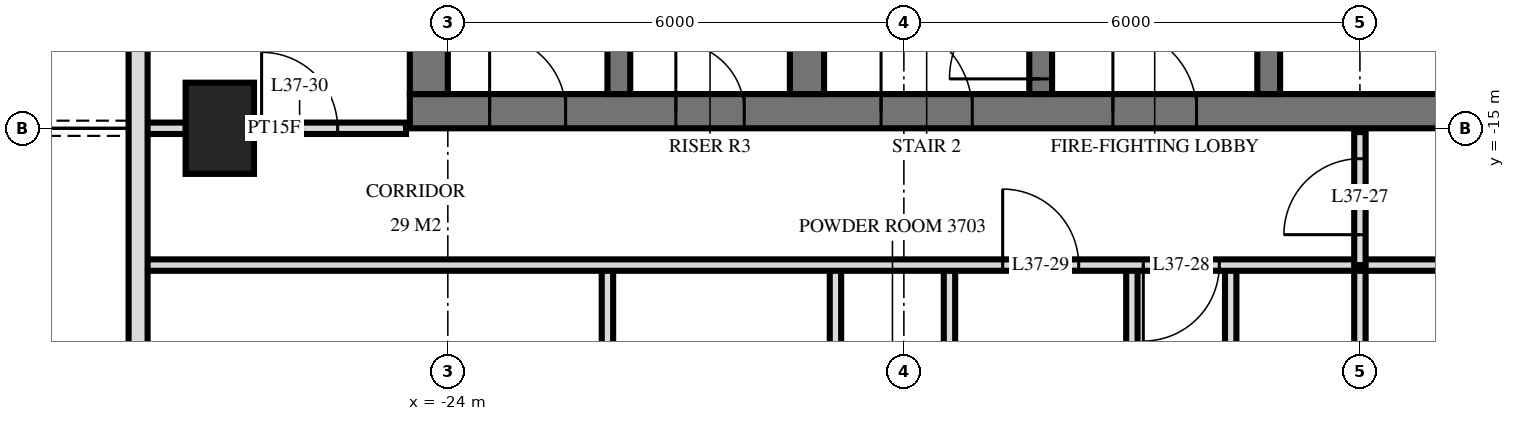
"""IFC4 building model, lengths in metres.
Left out: names, types, materials, properties, quantities, classifications, styles, units other than length and angle.
Written with IfcOpenShell. Run it as: python <this file> out.ifc"""

import sys

from ifc_helpers import new_model, si_unit, direction, frame, frame_2d, origin, origin_2d, place, context, subcontext, project, spatial, rectangle, extrude, element, fill, save


model = new_model("IFC4")
c1 = context("Model", 3, precision=1e-05, world=origin(), true_north=direction((0.0, 1.0)))
c2 = subcontext(c1, "Body", "Model", "MODEL_VIEW")
j1 = project(units=[si_unit("LENGTHUNIT", "METRE"), si_unit("PLANEANGLEUNIT", "RADIAN")], contexts=[c1])
p1 = place(None, origin())
s1 = spatial("IfcSite", under=j1, at=p1, CompositionType="ELEMENT")
p2 = place(p1, origin())
s2 = spatial("IfcBuilding", under=s1, at=p2, CompositionType="ELEMENT")
p3 = place(p2, frame((0.0, 0.0, 145.2)))
s3 = spatial("IfcBuildingStorey", under=s2, at=p3, CompositionType="ELEMENT", Elevation=145.2)
p4 = place(p3, frame((-27.0, -15.0, 0.0), z_axis=(0.0, 0.0, 1.0), x_axis=(0.0, 1.0, 0.0)))
e1 = element("IfcColumn", 1, at=p4, inside=s3, PredefinedType="COLUMN", context=c2, shape_type="SweptSolid", body=[
    extrude(rectangle(XDim=1.2, YDim=0.9, at=origin_2d()), origin(), (0.0, 0.0, 1.0), 3.6),
])
p5 = place(p3, frame((-24.5, -14.775, 0.0), z_axis=(0.0, 0.0, 1.0), x_axis=(1.0, 0.0, 0.0)))
e2 = element("IfcWall", 2, at=p5, inside=s3, PredefinedType="SHEAR", context=c2, shape_type="SweptSolid", body=[
    extrude(rectangle(XDim=14.5, YDim=0.45, at=frame_2d((7.25, 0.0))), origin(), (0.0, 0.0, 1.0), 3.6),
])
p6 = place(p5, frame((6.2, 0.0, 0.0)))
e3 = element("IfcOpeningElement", 3, at=p6, cuts=e2, PredefinedType="OPENING", context=c2, shape_type="SweptSolid", body=[
    extrude(rectangle(XDim=1.2, YDim=2.1, at=frame_2d((0.6, 1.05))), frame((0.0, 0.235, 0.0), z_axis=(0.0, -1.0, 0.0), x_axis=(1.0, 0.0, 0.0)), (0.0, 0.0, 1.0), 0.47),
])
p7 = place(p5, frame((9.25, 0.0, 0.0)))
e4 = element("IfcOpeningElement", 4, at=p7, cuts=e2, PredefinedType="OPENING", context=c2, shape_type="SweptSolid", body=[
    extrude(rectangle(XDim=1.1, YDim=2.1, at=frame_2d((0.55, 1.05))), frame((0.0, 0.235, 0.0), z_axis=(0.0, -1.0, 0.0), x_axis=(1.0, 0.0, 0.0)), (0.0, 0.0, 1.0), 0.47),
])
p8 = place(p5, frame((3.5, 0.0, 0.0)))
e5 = element("IfcOpeningElement", 5, at=p8, cuts=e2, PredefinedType="OPENING", context=c2, shape_type="SweptSolid", body=[
    extrude(rectangle(XDim=0.9, YDim=2.1, at=frame_2d((0.45, 1.05))), frame((0.0, 0.235, 0.0), z_axis=(0.0, -1.0, 0.0), x_axis=(1.0, 0.0, 0.0)), (0.0, 0.0, 1.0), 0.47),
])
p9 = place(p5, frame((1.05, 0.0, 0.0)))
e6 = element("IfcOpeningElement", 6, at=p9, cuts=e2, PredefinedType="OPENING", context=c2, shape_type="SweptSolid", body=[
    extrude(rectangle(XDim=1.0, YDim=2.1, at=frame_2d((0.5, 1.05))), frame((0.0, 0.235, 0.0), z_axis=(0.0, -1.0, 0.0), x_axis=(1.0, 0.0, 0.0)), (0.0, 0.0, 1.0), 0.47),
])
p10 = place(p3, frame((-24.25, -14.55, 0.0), z_axis=(0.0, 0.0, 1.0), x_axis=(0.0, 1.0, 0.0)))
e7 = element("IfcWall", 7, at=p10, inside=s3, PredefinedType="SHEAR", context=c2, shape_type="SweptSolid", body=[
    extrude(rectangle(XDim=14.1, YDim=0.5, at=frame_2d((7.05, 0.0))), origin(), (0.0, 0.0, 1.0), 3.6),
])
p11 = place(p3, frame((-13.2, -14.55, 0.0), z_axis=(0.0, 0.0, 1.0), x_axis=(0.0, 1.0, 0.0)))
e8 = element("IfcWall", 8, at=p11, inside=s3, PredefinedType="SHEAR", context=c2, shape_type="SweptSolid", body=[
    extrude(rectangle(XDim=5.4, YDim=0.3, at=frame_2d((2.7, 0.0))), origin(), (0.0, 0.0, 1.0), 3.6),
])
p12 = place(p11, frame((4.0, 0.0, 0.0)))
e9 = element("IfcOpeningElement", 9, at=p12, cuts=e8, PredefinedType="OPENING", context=c2, shape_type="SweptSolid", body=[
    extrude(rectangle(XDim=1.2, YDim=2.1, at=frame_2d((0.6, 1.05))), frame((0.0, 0.16, 0.0), z_axis=(0.0, -1.0, 0.0), x_axis=(1.0, 0.0, 0.0)), (0.0, 0.0, 1.0), 0.32),
])
p13 = place(p3, frame((-16.2, -14.55, 0.0), z_axis=(0.0, 0.0, 1.0), x_axis=(0.0, 1.0, 0.0)))
e10 = element("IfcWall", 10, at=p13, inside=s3, PredefinedType="SHEAR", context=c2, shape_type="SweptSolid", body=[
    extrude(rectangle(XDim=5.4, YDim=0.3, at=frame_2d((2.7, 0.0))), origin(), (0.0, 0.0, 1.0), 3.6),
])
p14 = place(p13, frame((0.2, 0.0, 0.0)))
e11 = element("IfcOpeningElement", 11, at=p14, cuts=e10, PredefinedType="OPENING", context=c2, shape_type="SweptSolid", body=[
    extrude(rectangle(XDim=1.2, YDim=2.1, at=frame_2d((0.6, 1.05))), frame((0.0, 0.16, 0.0), z_axis=(0.0, -1.0, 0.0), x_axis=(1.0, 0.0, 0.0)), (0.0, 0.0, 1.0), 0.32),
])
p15 = place(p3, frame((-19.275, -14.55, 0.0), z_axis=(0.0, 0.0, 1.0), x_axis=(0.0, 1.0, 0.0)))
e12 = element("IfcWall", 12, at=p15, inside=s3, PredefinedType="SHEAR", context=c2, shape_type="SweptSolid", body=[
    extrude(rectangle(XDim=5.4, YDim=0.45, at=frame_2d((2.7, 0.0))), origin(), (0.0, 0.0, 1.0), 3.6),
])
p16 = place(p3, frame((-21.75, -14.55, 0.0), z_axis=(0.0, 0.0, 1.0), x_axis=(0.0, 1.0, 0.0)))
e13 = element("IfcWall", 13, at=p16, inside=s3, PredefinedType="SHEAR", context=c2, shape_type="SweptSolid", body=[
    extrude(rectangle(XDim=5.4, YDim=0.3, at=frame_2d((2.7, 0.0))), origin(), (0.0, 0.0, 1.0), 3.6),
])
p17 = place(p3, frame((-28.075, -3.325, 0.0), z_axis=(0.0, 0.0, 1.0), x_axis=(0.0, -1.0, 0.0)))
e14 = element("IfcWall", 14, at=p17, inside=s3, PredefinedType="SOLIDWALL", context=c2, shape_type="SweptSolid", body=[
    extrude(rectangle(XDim=25.951, YDim=0.25, at=frame_2d((12.975, 0.0))), origin(), (0.0, 0.0, 1.0), 3.32),
])
p18 = place(p17, frame((7.275, 0.0, 0.0)))
e15 = element("IfcOpeningElement", 15, at=p18, cuts=e14, PredefinedType="OPENING", context=c2, shape_type="SweptSolid", body=[
    extrude(rectangle(XDim=1.8, YDim=2.4, at=frame_2d((0.9, 1.2))), frame((0.0, 0.135, 0.0), z_axis=(0.0, -1.0, 0.0), x_axis=(1.0, 0.0, 0.0)), (0.0, 0.0, 1.0), 0.27),
])
p19 = place(p17, frame((18.175, 0.0, 0.0)))
e16 = element("IfcOpeningElement", 16, at=p19, cuts=e14, PredefinedType="OPENING", context=c2, shape_type="SweptSolid", body=[
    extrude(rectangle(XDim=1.8, YDim=2.4, at=frame_2d((0.9, 1.2))), frame((0.0, 0.135, 0.0), z_axis=(0.0, -1.0, 0.0), x_axis=(1.0, 0.0, 0.0)), (0.0, 0.0, 1.0), 0.27),
])
p20 = place(p17, frame((21.075, 0.0, 0.0)))
e17 = element("IfcOpeningElement", 17, at=p20, cuts=e14, PredefinedType="OPENING", context=c2, shape_type="SweptSolid", body=[
    extrude(rectangle(XDim=1.8, YDim=2.4, at=frame_2d((0.9, 1.2))), frame((0.0, 0.135, 0.0), z_axis=(0.0, -1.0, 0.0), x_axis=(1.0, 0.0, 0.0)), (0.0, 0.0, 1.0), 0.27),
])
p21 = place(p17, frame((23.825, 0.0, 0.3)))
e18 = element("IfcOpeningElement", 18, at=p21, cuts=e14, PredefinedType="OPENING", context=c2, shape_type="SweptSolid", body=[
    extrude(rectangle(XDim=1.8, YDim=2.1, at=frame_2d((0.9, 1.05))), frame((0.0, 0.135, 0.0), z_axis=(0.0, -1.0, 0.0), x_axis=(1.0, 0.0, 0.0)), (0.0, 0.0, 1.0), 0.27),
])
p22 = place(p3, frame((-12.0, -16.8, 0.0), z_axis=(0.0, 0.0, 1.0), x_axis=(0.0, 1.0, 0.0)))
e19 = element("IfcWall", 19, at=p22, inside=s3, PredefinedType="PARTITIONING", context=c2, shape_type="SweptSolid", body=[
    extrude(rectangle(XDim=1.75, YDim=0.15, at=frame_2d((0.875, 0.0))), origin(), (0.0, 0.0, 1.0), 3.32),
])
p23 = place(p22, frame((0.4, 0.0, 0.0)))
e20 = element("IfcOpeningElement", 20, at=p23, cuts=e19, PredefinedType="OPENING", context=c2, shape_type="SweptSolid", body=[
    extrude(rectangle(XDim=1.0, YDim=2.1, at=frame_2d((0.5, 1.05))), frame((0.0, 0.085, 0.0), z_axis=(0.0, -1.0, 0.0), x_axis=(1.0, 0.0, 0.0)), (0.0, 0.0, 1.0), 0.17),
])
p24 = place(p3, frame((-12.0, -33.62, 0.0), z_axis=(0.0, 0.0, 1.0), x_axis=(0.0, 1.0, 0.0)))
e21 = element("IfcWall", 21, at=p24, inside=s3, PredefinedType="PARTITIONING", context=c2, shape_type="SweptSolid", body=[
    extrude(rectangle(XDim=16.82, YDim=0.15, at=frame_2d((8.41, 0.0))), origin(), (0.0, 0.0, 1.0), 3.32),
])
p25 = place(p3, frame((-13.7, -21.8, 0.0), z_axis=(0.0, 0.0, 1.0), x_axis=(0.0, 1.0, 0.0)))
e22 = element("IfcWall", 22, at=p25, inside=s3, PredefinedType="PARTITIONING", context=c2, shape_type="SweptSolid", body=[
    extrude(rectangle(XDim=5.0, YDim=0.15, at=frame_2d((2.5, 0.0))), origin(), (0.0, 0.0, 1.0), 3.32),
])
p26 = place(p25, frame((2.1, 0.0, 0.0)))
e23 = element("IfcOpeningElement", 23, at=p26, cuts=e22, PredefinedType="OPENING", context=c2, shape_type="SweptSolid", body=[
    extrude(rectangle(XDim=0.8, YDim=2.1, at=frame_2d((0.4, 1.05))), frame((0.0, 0.085, 0.0), z_axis=(0.0, -1.0, 0.0), x_axis=(1.0, 0.0, 0.0)), (0.0, 0.0, 1.0), 0.17),
])
p27 = place(p3, frame((-15.0, -21.0, 0.0), z_axis=(0.0, 0.0, 1.0), x_axis=(0.0, 1.0, 0.0)))
e24 = element("IfcWall", 24, at=p27, inside=s3, PredefinedType="PARTITIONING", context=c2, shape_type="SweptSolid", body=[
    extrude(rectangle(XDim=4.2, YDim=0.15, at=frame_2d((2.1, 0.0))), origin(), (0.0, 0.0, 1.0), 3.32),
])
p28 = place(p3, frame((-17.4, -21.0, 0.0), z_axis=(0.0, 0.0, 1.0), x_axis=(0.0, 1.0, 0.0)))
e25 = element("IfcWall", 25, at=p28, inside=s3, PredefinedType="PARTITIONING", context=c2, shape_type="SweptSolid", body=[
    extrude(rectangle(XDim=4.2, YDim=0.15, at=frame_2d((2.1, 0.0))), origin(), (0.0, 0.0, 1.0), 3.32),
])
p29 = place(p28, frame((1.6, 0.0, 0.0)))
e26 = element("IfcOpeningElement", 26, at=p29, cuts=e25, PredefinedType="OPENING", context=c2, shape_type="SweptSolid", body=[
    extrude(rectangle(XDim=1.0, YDim=2.1, at=frame_2d((0.5, 1.05))), frame((0.0, 0.085, 0.0), z_axis=(0.0, -1.0, 0.0), x_axis=(1.0, 0.0, 0.0)), (0.0, 0.0, 1.0), 0.17),
])
p30 = place(p3, frame((-18.9, -21.0, 0.0), z_axis=(0.0, 0.0, 1.0), x_axis=(0.0, 1.0, 0.0)))
e27 = element("IfcWall", 27, at=p30, inside=s3, PredefinedType="PLUMBINGWALL", context=c2, shape_type="SweptSolid", body=[
    extrude(rectangle(XDim=4.2, YDim=0.15, at=frame_2d((2.1, 0.0))), origin(), (0.0, 0.0, 1.0), 3.32),
])
p31 = place(p3, frame((-21.9, -21.0, 0.0), z_axis=(0.0, 0.0, 1.0), x_axis=(0.0, 1.0, 0.0)))
e28 = element("IfcWall", 28, at=p31, inside=s3, PredefinedType="PARTITIONING", context=c2, shape_type="SweptSolid", body=[
    extrude(rectangle(XDim=4.2, YDim=0.15, at=frame_2d((2.1, 0.0))), origin(), (0.0, 0.0, 1.0), 3.32),
])
p32 = place(p3, frame((-28.02, -16.8, 0.0), z_axis=(0.0, 0.0, 1.0), x_axis=(1.0, 0.0, 0.0)))
e29 = element("IfcWall", 29, at=p32, inside=s3, PredefinedType="PARTITIONING", context=c2, shape_type="SweptSolid", body=[
    extrude(rectangle(XDim=56.04, YDim=0.15, at=frame_2d((28.02, 0.0))), origin(), (0.0, 0.0, 1.0), 3.32),
])
p33 = place(p32, frame((13.17, 0.0, 0.0)))
e30 = element("IfcOpeningElement", 30, at=p33, cuts=e29, PredefinedType="OPENING", context=c2, shape_type="SweptSolid", body=[
    extrude(rectangle(XDim=1.0, YDim=2.1, at=frame_2d((0.5, 1.05))), frame((0.0, 0.085, 0.0), z_axis=(0.0, -1.0, 0.0), x_axis=(1.0, 0.0, 0.0)), (0.0, 0.0, 1.0), 0.17),
])
p34 = place(p32, frame((11.32, 0.0, 0.0)))
e31 = element("IfcOpeningElement", 31, at=p34, cuts=e29, PredefinedType="OPENING", context=c2, shape_type="SweptSolid", body=[
    extrude(rectangle(XDim=1.0, YDim=2.1, at=frame_2d((0.5, 1.05))), frame((0.0, 0.085, 0.0), z_axis=(0.0, -1.0, 0.0), x_axis=(1.0, 0.0, 0.0)), (0.0, 0.0, 1.0), 0.17),
])
p35 = place(p32, frame((41.87, 0.0, 0.0)))
e32 = element("IfcOpeningElement", 32, at=p35, cuts=e29, PredefinedType="OPENING", context=c2, shape_type="SweptSolid", body=[
    extrude(rectangle(XDim=1.0, YDim=2.1, at=frame_2d((0.5, 1.05))), frame((0.0, 0.085, 0.0), z_axis=(0.0, -1.0, 0.0), x_axis=(1.0, 0.0, 0.0)), (0.0, 0.0, 1.0), 0.17),
])
p36 = place(p32, frame((43.72, 0.0, 0.0)))
e33 = element("IfcOpeningElement", 33, at=p36, cuts=e29, PredefinedType="OPENING", context=c2, shape_type="SweptSolid", body=[
    extrude(rectangle(XDim=1.0, YDim=2.1, at=frame_2d((0.5, 1.05))), frame((0.0, 0.085, 0.0), z_axis=(0.0, -1.0, 0.0), x_axis=(1.0, 0.0, 0.0)), (0.0, 0.0, 1.0), 0.17),
])
p37 = place(p32, frame((19.52, 0.0, 0.0)))
e34 = element("IfcOpeningElement", 34, at=p37, cuts=e29, PredefinedType="OPENING", context=c2, shape_type="SweptSolid", body=[
    extrude(rectangle(XDim=1.0, YDim=2.1, at=frame_2d((0.5, 1.05))), frame((0.0, 0.085, 0.0), z_axis=(0.0, -1.0, 0.0), x_axis=(1.0, 0.0, 0.0)), (0.0, 0.0, 1.0), 0.17),
])
p38 = place(p32, frame((27.52, 0.0, 0.0)))
e35 = element("IfcOpeningElement", 35, at=p38, cuts=e29, PredefinedType="OPENING", context=c2, shape_type="SweptSolid", body=[
    extrude(rectangle(XDim=1.0, YDim=2.1, at=frame_2d((0.5, 1.05))), frame((0.0, 0.085, 0.0), z_axis=(0.0, -1.0, 0.0), x_axis=(1.0, 0.0, 0.0)), (0.0, 0.0, 1.0), 0.17),
])
p39 = place(p32, frame((35.52, 0.0, 0.0)))
e36 = element("IfcOpeningElement", 36, at=p39, cuts=e29, PredefinedType="OPENING", context=c2, shape_type="SweptSolid", body=[
    extrude(rectangle(XDim=1.0, YDim=2.1, at=frame_2d((0.5, 1.05))), frame((0.0, 0.085, 0.0), z_axis=(0.0, -1.0, 0.0), x_axis=(1.0, 0.0, 0.0)), (0.0, 0.0, 1.0), 0.17),
])
p40 = place(p3, frame((-28.02, -15.0, 0.0), z_axis=(0.0, 0.0, 1.0), x_axis=(1.0, 0.0, 0.0)))
e37 = element("IfcWall", 37, at=p40, inside=s3, PredefinedType="PARTITIONING", context=c2, shape_type="SweptSolid", body=[
    extrude(rectangle(XDim=3.47, YDim=0.15, at=frame_2d((1.735, 0.0))), origin(), (0.0, 0.0, 1.0), 3.32),
])
p41 = place(p40, frame((1.57, 0.0, 0.0)))
e38 = element("IfcOpeningElement", 38, at=p41, cuts=e37, PredefinedType="OPENING", context=c2, shape_type="SweptSolid", body=[
    extrude(rectangle(XDim=1.0, YDim=2.1, at=frame_2d((0.5, 1.05))), frame((0.0, 0.085, 0.0), z_axis=(0.0, -1.0, 0.0), x_axis=(1.0, 0.0, 0.0)), (0.0, 0.0, 1.0), 0.17),
])
p42 = place(p6, origin())
e39 = element("IfcDoor", 39, at=p42, inside=s3, OperationType="SINGLE_SWING_RIGHT", PredefinedType="DOOR", context=c2, shape_type="SweptSolid", body=[
    extrude(rectangle(XDim=1.2, YDim=2.1, at=frame_2d((0.6, 1.05))), frame((0.0, 0.025, 0.0), z_axis=(0.0, -1.0, 0.0), x_axis=(1.0, 0.0, 0.0)), (0.0, 0.0, 1.0), 0.05),
])
fill(e3, e39)
p43 = place(p7, origin())
e40 = element("IfcDoor", 40, at=p43, inside=s3, OperationType="SINGLE_SWING_RIGHT", PredefinedType="DOOR", context=c2, shape_type="SweptSolid", body=[
    extrude(rectangle(XDim=1.1, YDim=2.1, at=frame_2d((0.55, 1.05))), frame((0.0, 0.025, 0.0), z_axis=(0.0, -1.0, 0.0), x_axis=(1.0, 0.0, 0.0)), (0.0, 0.0, 1.0), 0.05),
])
fill(e4, e40)
p44 = place(p8, origin())
e41 = element("IfcDoor", 41, at=p44, inside=s3, OperationType="SINGLE_SWING_RIGHT", PredefinedType="DOOR", context=c2, shape_type="SweptSolid", body=[
    extrude(rectangle(XDim=0.9, YDim=2.1, at=frame_2d((0.45, 1.05))), frame((0.0, 0.025, 0.0), z_axis=(0.0, -1.0, 0.0), x_axis=(1.0, 0.0, 0.0)), (0.0, 0.0, 1.0), 0.05),
])
fill(e5, e41)
p45 = place(p9, origin())
e42 = element("IfcDoor", 42, at=p45, inside=s3, OperationType="SINGLE_SWING_RIGHT", PredefinedType="DOOR", context=c2, shape_type="SweptSolid", body=[
    extrude(rectangle(XDim=1.0, YDim=2.1, at=frame_2d((0.5, 1.05))), frame((0.0, 0.025, 0.0), z_axis=(0.0, -1.0, 0.0), x_axis=(1.0, 0.0, 0.0)), (0.0, 0.0, 1.0), 0.05),
])
fill(e6, e42)
p46 = place(p14, origin())
e43 = element("IfcDoor", 43, at=p46, inside=s3, OperationType="SINGLE_SWING_RIGHT", PredefinedType="DOOR", context=c2, shape_type="SweptSolid", body=[
    extrude(rectangle(XDim=1.2, YDim=2.1, at=frame_2d((0.6, 1.05))), frame((0.0, 0.025, 0.0), z_axis=(0.0, -1.0, 0.0), x_axis=(1.0, 0.0, 0.0)), (0.0, 0.0, 1.0), 0.05),
])
fill(e11, e43)
p47 = place(p23, origin())
e44 = element("IfcDoor", 44, at=p47, inside=s3, OperationType="SINGLE_SWING_RIGHT", PredefinedType="DOOR", context=c2, shape_type="SweptSolid", body=[
    extrude(rectangle(XDim=1.0, YDim=2.1, at=frame_2d((0.5, 1.05))), frame((0.0, 0.025, 0.0), z_axis=(0.0, -1.0, 0.0), x_axis=(1.0, 0.0, 0.0)), (0.0, 0.0, 1.0), 0.05),
])
fill(e20, e44)
p48 = place(p33, frame((0.5, 0.0, 0.0), z_axis=(0.0, 0.0, 1.0), x_axis=(-1.0, 0.0, 0.0)))
e45 = element("IfcDoor", 45, at=p48, inside=s3, OperationType="SINGLE_SWING_LEFT", PredefinedType="DOOR", context=c2, shape_type="SweptSolid", body=[
    extrude(rectangle(XDim=1.0, YDim=2.1, at=frame_2d((0.0, 1.05))), frame((0.0, -0.025, 0.0), z_axis=(0.0, 1.0, 0.0), x_axis=(-1.0, 0.0, 0.0)), (0.0, 0.0, 1.0), 0.05),
])
fill(e30, e45)
p49 = place(p34, origin())
e46 = element("IfcDoor", 46, at=p49, inside=s3, OperationType="SINGLE_SWING_RIGHT", PredefinedType="DOOR", context=c2, shape_type="SweptSolid", body=[
    extrude(rectangle(XDim=1.0, YDim=2.1, at=frame_2d((0.5, 1.05))), frame((0.0, 0.025, 0.0), z_axis=(0.0, -1.0, 0.0), x_axis=(1.0, 0.0, 0.0)), (0.0, 0.0, 1.0), 0.05),
])
fill(e31, e46)
p50 = place(p41, origin())
e47 = element("IfcDoor", 47, at=p50, inside=s3, OperationType="SINGLE_SWING_RIGHT", PredefinedType="DOOR", context=c2, shape_type="SweptSolid", body=[
    extrude(rectangle(XDim=1.0, YDim=2.1, at=frame_2d((0.5, 1.05))), frame((0.0, 0.025, 0.0), z_axis=(0.0, -1.0, 0.0), x_axis=(1.0, 0.0, 0.0)), (0.0, 0.0, 1.0), 0.05),
])
fill(e38, e47)
save(model, sys.argv[1])
